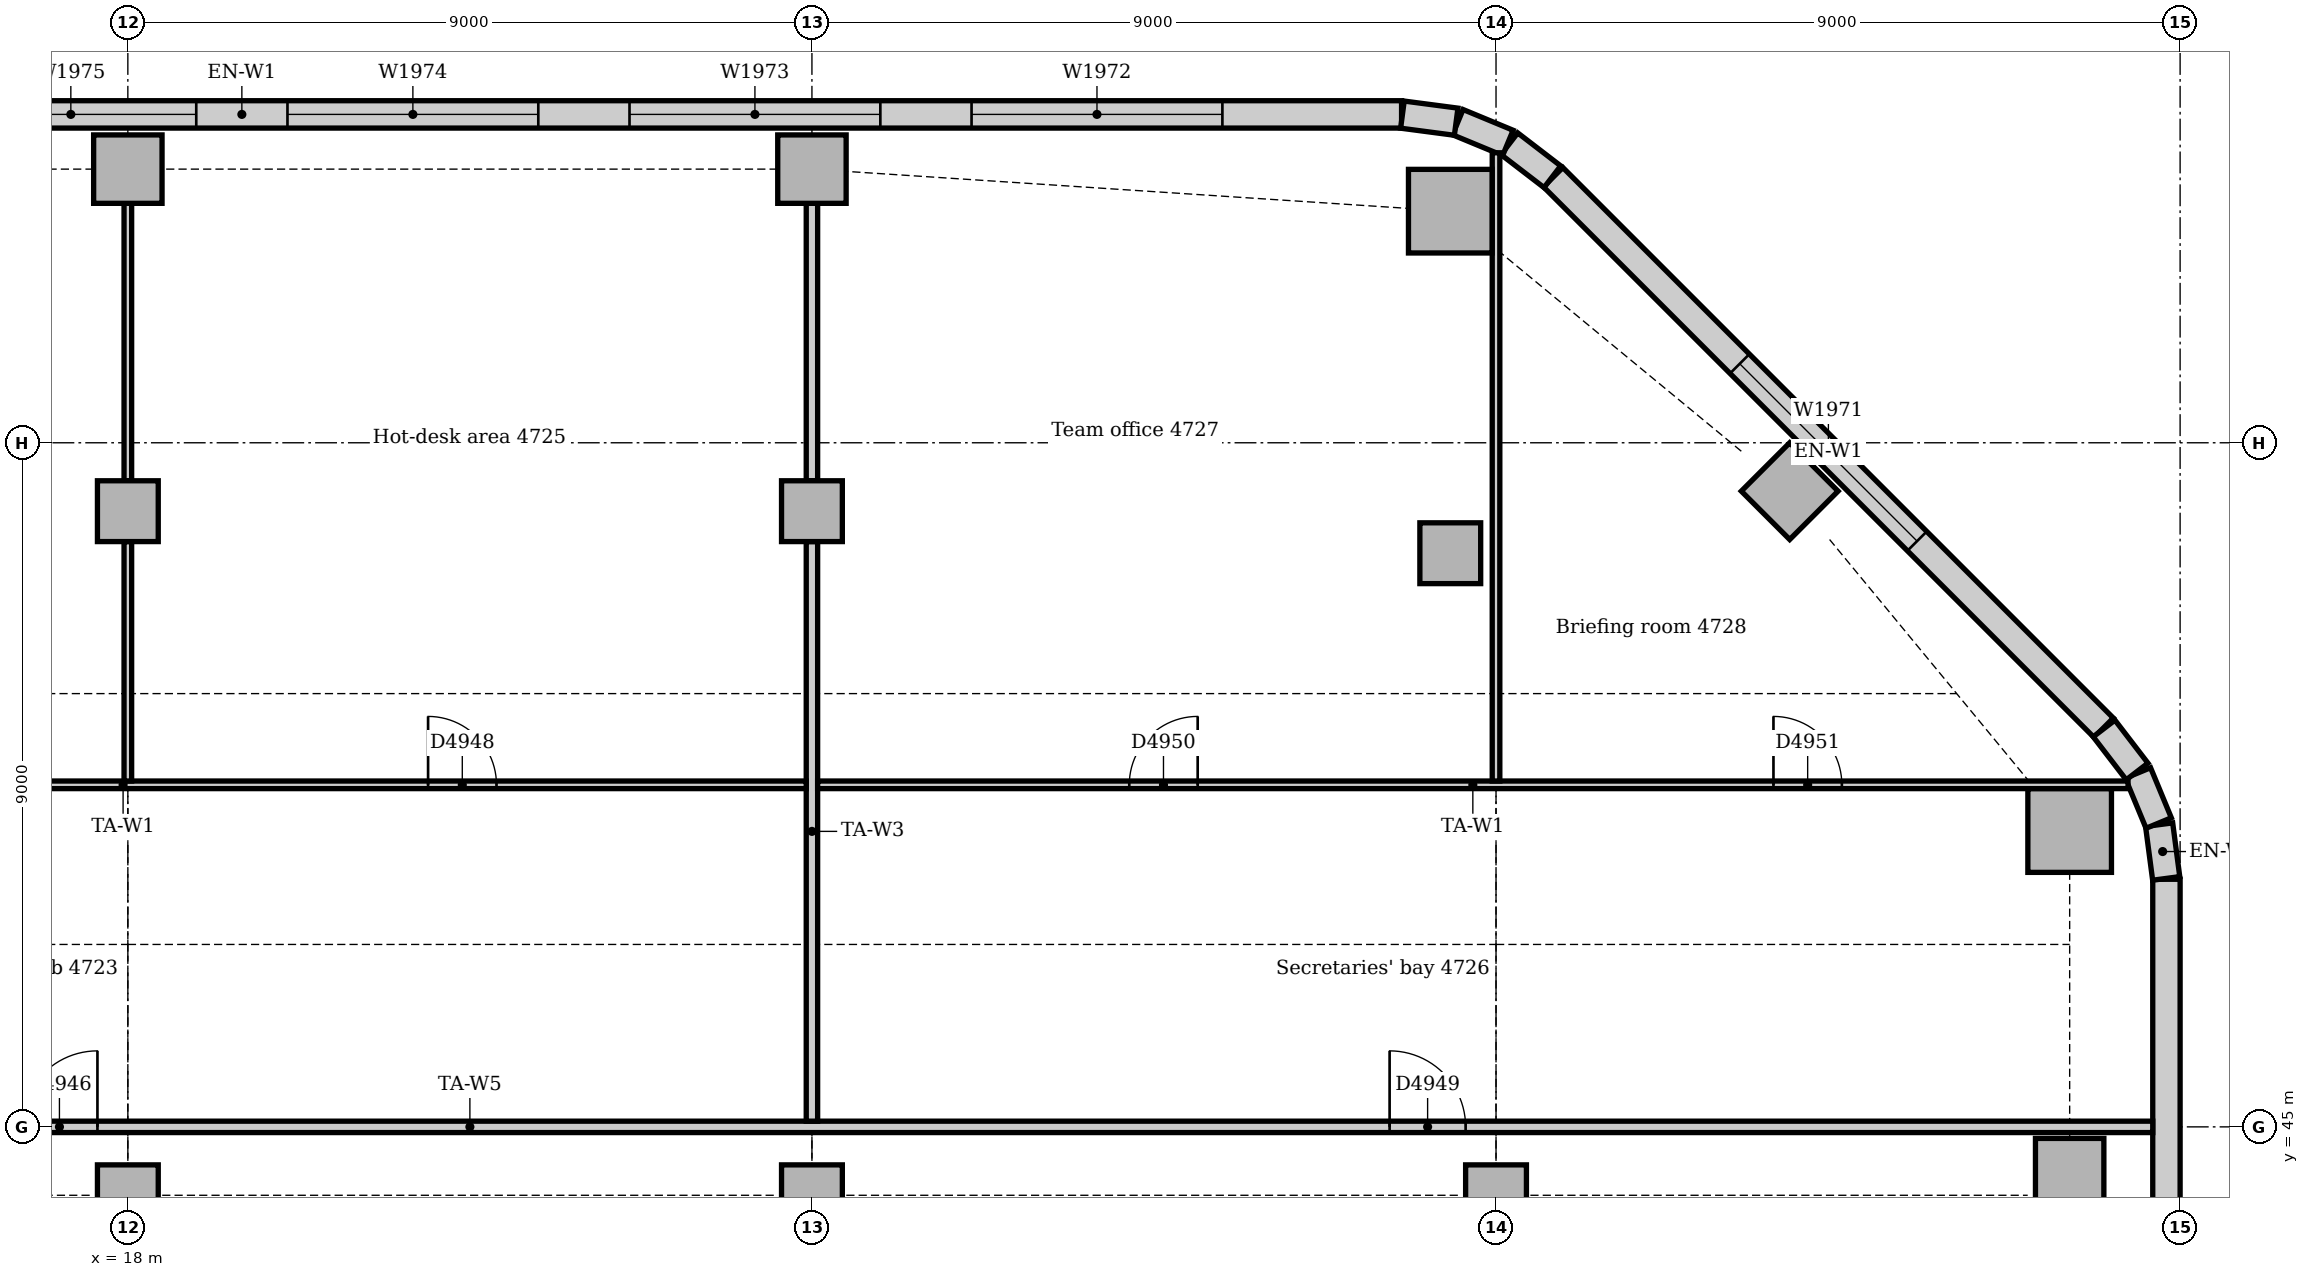
"""IFC4 building model, lengths in metres.
Left out: names, types, materials, properties, quantities, classifications, styles, units other than length and angle.
Written with IfcOpenShell. Run it as: python <this file> out.ifc"""

import sys

from ifc_helpers import new_model, si_unit, direction, frame, frame_2d, origin, origin_2d, place, context, subcontext, project, spatial, rectangle, extrude, element, fill, save


model = new_model("IFC4")
c1 = context("Model", 3, precision=1e-05, world=origin(), true_north=direction((0.0, 1.0)))
c2 = subcontext(c1, "Body", "Model", "MODEL_VIEW")
j1 = project(units=[si_unit("LENGTHUNIT", "METRE"), si_unit("PLANEANGLEUNIT", "RADIAN")], contexts=[c1])
p1 = place(None, origin())
s1 = spatial("IfcSite", under=j1, at=p1, CompositionType="ELEMENT")
p2 = place(p1, origin())
s2 = spatial("IfcBuilding", under=s1, at=p2, CompositionType="ELEMENT")
p3 = place(p2, frame((0.0, 0.0, 198.0)))
s3 = spatial("IfcBuildingStorey", under=s2, at=p3, CompositionType="ELEMENT", Elevation=198.0)
for number, where, z_axis, x_axis in (
    (1, (43.547, 48.898, -0.15), (0.0, 0.0, 1.0), (1.0, 0.0, 0.0)),
    (2, (35.398, 57.047, -0.15), (0.0, 0.0, 1.0), (1.0, 0.0, 0.0)),
):
    element("IfcColumn", number, at=place(p3, frame(where, z_axis=z_axis, x_axis=x_axis)), inside=s3, PredefinedType="COLUMN", context=c2, shape_type="SweptSolid", body=[
        extrude(rectangle(XDim=1.1, YDim=1.1, at=origin_2d()), origin(), (0.0, 0.0, 1.0), 4.0),
    ])
p4 = place(p3, frame((43.547, 44.398, 0.0), z_axis=(0.0, 0.0, 1.0), x_axis=(1.0, 0.0, 0.0)))
e3 = element("IfcColumn", 3, at=p4, inside=s3, PredefinedType="COLUMN", context=c2, shape_type="SweptSolid", body=[
    extrude(rectangle(XDim=0.9, YDim=0.9, at=origin_2d()), origin(), (0.0, 0.0, 1.0), 3.85),
])
for number, where, z_axis, x_axis in (
    (4, (39.864, 53.364, -0.15), (0.0, 0.0, 1.0), (0.707, 0.707, 0.0)),
    (5, (18.0, 57.6, -0.15), (0.0, 0.0, 1.0), (1.0, 0.0, 0.0)),
    (6, (27.0, 57.6, -0.15), (0.0, 0.0, 1.0), (1.0, 0.0, 0.0)),
):
    element("IfcColumn", number, at=place(p3, frame(where, z_axis=z_axis, x_axis=x_axis)), inside=s3, PredefinedType="COLUMN", context=c2, shape_type="SweptSolid", body=[
        extrude(rectangle(XDim=0.9, YDim=0.9, at=origin_2d()), origin(), (0.0, 0.0, 1.0), 4.0),
    ])
for number, where, z_axis, x_axis in (
    (7, (18.0, 44.1, 0.0), (0.0, 0.0, 1.0), (1.0, 0.0, 0.0)),
    (8, (18.0, 53.1, 0.0), (0.0, 0.0, 1.0), (1.0, 0.0, 0.0)),
    (9, (27.0, 44.1, 0.0), (0.0, 0.0, 1.0), (1.0, 0.0, 0.0)),
    (10, (27.0, 53.1, 0.0), (0.0, 0.0, 1.0), (1.0, 0.0, 0.0)),
    (11, (36.0, 44.1, 0.0), (0.0, 0.0, 1.0), (1.0, 0.0, 0.0)),
    (12, (35.398, 52.547, 0.0), (0.0, 0.0, 1.0), (1.0, 0.0, 0.0)),
):
    element("IfcColumn", number, at=place(p3, frame(where, z_axis=z_axis, x_axis=x_axis)), inside=s3, PredefinedType="COLUMN", context=c2, shape_type="SweptSolid", body=[
        extrude(rectangle(XDim=0.8, YDim=0.8, at=origin_2d()), origin(), (0.0, 0.0, 1.0), 3.85),
    ])
p5 = place(p3, frame((44.82, 23.743, 0.0), z_axis=(0.0, 0.0, 1.0), x_axis=(0.0, 1.0, 0.0)))
e13 = element("IfcWall", 13, at=p5, inside=s3, PredefinedType="STANDARD", context=c2, shape_type="SweptSolid", body=[
    extrude(rectangle(XDim=24.515, YDim=0.36, at=frame_2d((12.257, 0.0))), origin(), (0.0, 0.0, 1.0), 3.85),
])
p6 = place(p5, frame((3.857, 0.0, 0.9)))
e14 = element("IfcOpeningElement", 14, at=p6, cuts=e13, PredefinedType="OPENING", context=c2, shape_type="SweptSolid", body=[
    extrude(rectangle(XDim=3.3, YDim=1.6, at=frame_2d((1.65, 0.8))), frame((0.0, 0.19, 0.0), z_axis=(0.0, -1.0, 0.0), x_axis=(1.0, 0.0, 0.0)), (0.0, 0.0, 1.0), 0.38),
])
p7 = place(p5, frame((8.357, 0.0, 0.9)))
e15 = element("IfcOpeningElement", 15, at=p7, cuts=e13, PredefinedType="OPENING", context=c2, shape_type="SweptSolid", body=[
    extrude(rectangle(XDim=3.3, YDim=1.6, at=frame_2d((1.65, 0.8))), frame((0.0, 0.19, 0.0), z_axis=(0.0, -1.0, 0.0), x_axis=(1.0, 0.0, 0.0)), (0.0, 0.0, 1.0), 0.38),
])
p8 = place(p5, frame((12.857, 0.0, 0.9)))
e16 = element("IfcOpeningElement", 16, at=p8, cuts=e13, PredefinedType="OPENING", context=c2, shape_type="SweptSolid", body=[
    extrude(rectangle(XDim=3.3, YDim=1.6, at=frame_2d((1.65, 0.8))), frame((0.0, 0.19, 0.0), z_axis=(0.0, -1.0, 0.0), x_axis=(1.0, 0.0, 0.0)), (0.0, 0.0, 1.0), 0.38),
])
p9 = place(p5, frame((18.457, 0.0, 0.9)))
e17 = element("IfcOpeningElement", 17, at=p9, cuts=e13, PredefinedType="OPENING", context=c2, shape_type="SweptSolid", body=[
    extrude(rectangle(XDim=1.8, YDim=1.6, at=frame_2d((0.9, 0.8))), frame((0.0, 0.19, 0.0), z_axis=(0.0, -1.0, 0.0), x_axis=(1.0, 0.0, 0.0)), (0.0, 0.0, 1.0), 0.38),
])
p10 = place(p3, frame((43.994, 50.251, 0.0), z_axis=(0.0, 0.0, 1.0), x_axis=(-0.707106781187, 0.707106781187, 0.0)))
e18 = element("IfcWall", 18, at=p10, inside=s3, PredefinedType="STANDARD", context=c2, shape_type="SweptSolid", body=[
    extrude(rectangle(XDim=10.243, YDim=0.36, at=frame_2d((5.121, 0.0))), origin(), (0.0, 0.0, 1.0), 3.85),
])
p11 = place(p10, frame((3.471, 0.0, 0.9)))
e19 = element("IfcOpeningElement", 19, at=p11, cuts=e18, PredefinedType="OPENING", context=c2, shape_type="SweptSolid", body=[
    extrude(rectangle(XDim=3.3, YDim=1.6, at=frame_2d((1.65, 0.8))), frame((0.0, 0.19, 0.0), z_axis=(0.0, -1.0, 0.0), x_axis=(1.0, 0.0, 0.0)), (0.0, 0.0, 1.0), 0.38),
])
p12 = place(p3, frame((34.757, 58.32, 0.0), z_axis=(0.0, 0.0, 1.0), x_axis=(-1.0, 0.0, 0.0)))
e20 = element("IfcWall", 20, at=p12, inside=s3, PredefinedType="STANDARD", context=c2, shape_type="SweptSolid", body=[
    extrude(rectangle(XDim=30.515, YDim=0.36, at=frame_2d((15.257, 0.0))), origin(), (0.0, 0.0, 1.0), 3.85),
])
p13 = place(p12, frame((2.357, 0.0, 0.9)))
e21 = element("IfcOpeningElement", 21, at=p13, cuts=e20, PredefinedType="OPENING", context=c2, shape_type="SweptSolid", body=[
    extrude(rectangle(XDim=3.3, YDim=1.6, at=frame_2d((1.65, 0.8))), frame((0.0, 0.19, 0.0), z_axis=(0.0, -1.0, 0.0), x_axis=(1.0, 0.0, 0.0)), (0.0, 0.0, 1.0), 0.38),
])
p14 = place(p12, frame((6.857, 0.0, 0.9)))
e22 = element("IfcOpeningElement", 22, at=p14, cuts=e20, PredefinedType="OPENING", context=c2, shape_type="SweptSolid", body=[
    extrude(rectangle(XDim=3.3, YDim=1.6, at=frame_2d((1.65, 0.8))), frame((0.0, 0.19, 0.0), z_axis=(0.0, -1.0, 0.0), x_axis=(1.0, 0.0, 0.0)), (0.0, 0.0, 1.0), 0.38),
])
p15 = place(p12, frame((11.357, 0.0, 0.9)))
e23 = element("IfcOpeningElement", 23, at=p15, cuts=e20, PredefinedType="OPENING", context=c2, shape_type="SweptSolid", body=[
    extrude(rectangle(XDim=3.3, YDim=1.6, at=frame_2d((1.65, 0.8))), frame((0.0, 0.19, 0.0), z_axis=(0.0, -1.0, 0.0), x_axis=(1.0, 0.0, 0.0)), (0.0, 0.0, 1.0), 0.38),
])
p16 = place(p12, frame((15.857, 0.0, 0.9)))
e24 = element("IfcOpeningElement", 24, at=p16, cuts=e20, PredefinedType="OPENING", context=c2, shape_type="SweptSolid", body=[
    extrude(rectangle(XDim=3.3, YDim=1.6, at=frame_2d((1.65, 0.8))), frame((0.0, 0.19, 0.0), z_axis=(0.0, -1.0, 0.0), x_axis=(1.0, 0.0, 0.0)), (0.0, 0.0, 1.0), 0.38),
])
p17 = place(p12, frame((20.357, 0.0, 0.9)))
e25 = element("IfcOpeningElement", 25, at=p17, cuts=e20, PredefinedType="OPENING", context=c2, shape_type="SweptSolid", body=[
    extrude(rectangle(XDim=3.3, YDim=1.6, at=frame_2d((1.65, 0.8))), frame((0.0, 0.19, 0.0), z_axis=(0.0, -1.0, 0.0), x_axis=(1.0, 0.0, 0.0)), (0.0, 0.0, 1.0), 0.38),
])
p18 = place(p12, frame((24.857, 0.0, 0.9)))
e26 = element("IfcOpeningElement", 26, at=p18, cuts=e20, PredefinedType="OPENING", context=c2, shape_type="SweptSolid", body=[
    extrude(rectangle(XDim=3.3, YDim=1.6, at=frame_2d((1.65, 0.8))), frame((0.0, 0.19, 0.0), z_axis=(0.0, -1.0, 0.0), x_axis=(1.0, 0.0, 0.0)), (0.0, 0.0, 1.0), 0.38),
])
for number, where, z_axis, x_axis in (
    (27, (44.817, 48.269, 0.0), (0.0, 0.0, 1.0), (-0.131, 0.991, 0.0)),
    (28, (44.718, 48.997, 0.0), (0.0, 0.0, 1.0), (-0.383, 0.924, 0.0)),
):
    element("IfcWall", number, at=place(p3, frame(where, z_axis=z_axis, x_axis=x_axis)), inside=s3, PredefinedType="STANDARD", context=c2, shape_type="SweptSolid", body=[
        extrude(rectangle(XDim=0.713, YDim=0.36, at=frame_2d((0.356, 0.0))), origin(), (0.0, 0.0, 1.0), 3.85),
    ])
for number, where, z_axis, x_axis in (
    (29, (44.434, 49.675, 0.0), (0.0, 0.0, 1.0), (-0.609, 0.793, 0.0)),
    (30, (36.741, 57.5, 0.0), (0.0, 0.0, 1.0), (-0.793, 0.609, 0.0)),
):
    element("IfcWall", number, at=place(p3, frame(where, z_axis=z_axis, x_axis=x_axis)), inside=s3, PredefinedType="STANDARD", context=c2, shape_type="SweptSolid", body=[
        extrude(rectangle(XDim=0.713, YDim=0.36, at=frame_2d((0.357, 0.0))), origin(), (0.0, 0.0, 1.0), 3.85),
    ])
for number, where, z_axis, x_axis in (
    (31, (36.156, 57.945, 0.0), (0.0, 0.0, 1.0), (-0.924, 0.383, 0.0)),
    (32, (35.476, 58.224, 0.0), (0.0, 0.0, 1.0), (-0.991, 0.131, 0.0)),
):
    element("IfcWall", number, at=place(p3, frame(where, z_axis=z_axis, x_axis=x_axis)), inside=s3, PredefinedType="STANDARD", context=c2, shape_type="SweptSolid", body=[
        extrude(rectangle(XDim=0.713, YDim=0.36, at=frame_2d((0.356, 0.0))), origin(), (0.0, 0.0, 1.0), 3.85),
    ])
p19 = place(p3, frame((0.36, 45.0, 0.0), z_axis=(0.0, 0.0, 1.0), x_axis=(1.0, 0.0, 0.0)))
e33 = element("IfcWall", 33, at=p19, inside=s3, PredefinedType="PARTITIONING", context=c2, shape_type="SweptSolid", body=[
    extrude(rectangle(XDim=44.28, YDim=0.15, at=frame_2d((22.14, 0.0))), origin(), (0.0, 0.0, 1.0), 3.85),
])
p20 = place(p19, frame((3.95, 0.0, 0.0)))
e34 = element("IfcOpeningElement", 34, at=p20, cuts=e33, PredefinedType="OPENING", context=c2, shape_type="SweptSolid", body=[
    extrude(rectangle(XDim=0.9, YDim=2.1, at=frame_2d((0.45, 1.05))), frame((0.0, 0.085, 0.0), z_axis=(0.0, -1.0, 0.0), x_axis=(1.0, 0.0, 0.0)), (0.0, 0.0, 1.0), 0.17),
])
p21 = place(p19, frame((16.24, 0.0, 0.0)))
e35 = element("IfcOpeningElement", 35, at=p21, cuts=e33, PredefinedType="OPENING", context=c2, shape_type="SweptSolid", body=[
    extrude(rectangle(XDim=1.0, YDim=2.1, at=frame_2d((0.5, 1.05))), frame((0.0, 0.085, 0.0), z_axis=(0.0, -1.0, 0.0), x_axis=(1.0, 0.0, 0.0)), (0.0, 0.0, 1.0), 0.17),
])
p22 = place(p19, frame((34.24, 0.0, 0.0)))
e36 = element("IfcOpeningElement", 36, at=p22, cuts=e33, PredefinedType="OPENING", context=c2, shape_type="SweptSolid", body=[
    extrude(rectangle(XDim=1.0, YDim=2.1, at=frame_2d((0.5, 1.05))), frame((0.0, 0.085, 0.0), z_axis=(0.0, -1.0, 0.0), x_axis=(1.0, 0.0, 0.0)), (0.0, 0.0, 1.0), 0.17),
])
p23 = place(p3, frame((27.0, 45.075, 0.0), z_axis=(0.0, 0.0, 1.0), x_axis=(0.0, 1.0, 0.0)))
e37 = element("IfcWall", 37, at=p23, inside=s3, PredefinedType="PARTITIONING", context=c2, shape_type="SweptSolid", body=[
    extrude(rectangle(XDim=7.625, YDim=0.15, at=frame_2d((3.812, 0.0))), origin(), (0.0, 0.0, 1.0), 3.35),
])
p24 = place(p3, frame((27.0, 53.5, 0.0), z_axis=(0.0, 0.0, 1.0), x_axis=(0.0, 1.0, 0.0)))
e38 = element("IfcWall", 38, at=p24, inside=s3, PredefinedType="PARTITIONING", context=c2, shape_type="SweptSolid", body=[
    extrude(rectangle(XDim=3.65, YDim=0.15, at=frame_2d((1.825, 0.0))), origin(), (0.0, 0.0, 1.0), 3.41),
])
p25 = place(p3, frame((8.95, 49.5, 0.0), z_axis=(0.0, 0.0, 1.0), x_axis=(1.0, 0.0, 0.0)))
e39 = element("IfcWall", 39, at=p25, inside=s3, PredefinedType="PARTITIONING", context=c2, shape_type="SweptSolid", body=[
    extrude(rectangle(XDim=17.975, YDim=0.1, at=frame_2d((8.988, 0.0))), origin(), (0.0, 0.0, 1.0), 3.85),
])
p26 = place(p25, frame((4.15, 0.0, 0.0)))
e40 = element("IfcOpeningElement", 40, at=p26, cuts=e39, PredefinedType="OPENING", context=c2, shape_type="SweptSolid", body=[
    extrude(rectangle(XDim=0.9, YDim=2.1, at=frame_2d((0.45, 1.05))), frame((0.0, 0.06, 0.0), z_axis=(0.0, -1.0, 0.0), x_axis=(1.0, 0.0, 0.0)), (0.0, 0.0, 1.0), 0.12),
])
p27 = place(p25, frame((13.0, 0.0, 0.0)))
e41 = element("IfcOpeningElement", 41, at=p27, cuts=e39, PredefinedType="OPENING", context=c2, shape_type="SweptSolid", body=[
    extrude(rectangle(XDim=0.9, YDim=2.1, at=frame_2d((0.45, 1.05))), frame((0.0, 0.06, 0.0), z_axis=(0.0, -1.0, 0.0), x_axis=(1.0, 0.0, 0.0)), (0.0, 0.0, 1.0), 0.12),
])
p28 = place(p3, frame((27.075, 49.5, 0.0), z_axis=(0.0, 0.0, 1.0), x_axis=(1.0, 0.0, 0.0)))
e42 = element("IfcWall", 42, at=p28, inside=s3, PredefinedType="PARTITIONING", context=c2, shape_type="SweptSolid", body=[
    extrude(rectangle(XDim=17.24, YDim=0.1, at=frame_2d((8.62, 0.0))), origin(), (0.0, 0.0, 1.0), 3.85),
])
p29 = place(p28, frame((4.1, 0.0, 0.0)))
e43 = element("IfcOpeningElement", 43, at=p29, cuts=e42, PredefinedType="OPENING", context=c2, shape_type="SweptSolid", body=[
    extrude(rectangle(XDim=0.9, YDim=2.1, at=frame_2d((0.45, 1.05))), frame((0.0, 0.06, 0.0), z_axis=(0.0, -1.0, 0.0), x_axis=(1.0, 0.0, 0.0)), (0.0, 0.0, 1.0), 0.12),
])
p30 = place(p28, frame((12.575, 0.0, 0.0)))
e44 = element("IfcOpeningElement", 44, at=p30, cuts=e42, PredefinedType="OPENING", context=c2, shape_type="SweptSolid", body=[
    extrude(rectangle(XDim=0.9, YDim=2.1, at=frame_2d((0.45, 1.05))), frame((0.0, 0.06, 0.0), z_axis=(0.0, -1.0, 0.0), x_axis=(1.0, 0.0, 0.0)), (0.0, 0.0, 1.0), 0.12),
])
p31 = place(p3, frame((18.0, 49.55, 0.0), z_axis=(0.0, 0.0, 1.0), x_axis=(0.0, 1.0, 0.0)))
e45 = element("IfcWall", 45, at=p31, inside=s3, PredefinedType="PARTITIONING", context=c2, shape_type="SweptSolid", body=[
    extrude(rectangle(XDim=3.15, YDim=0.1, at=frame_2d((1.575, 0.0))), origin(), (0.0, 0.0, 1.0), 3.35),
])
p32 = place(p3, frame((18.0, 53.5, 0.0), z_axis=(0.0, 0.0, 1.0), x_axis=(0.0, 1.0, 0.0)))
e46 = element("IfcWall", 46, at=p32, inside=s3, PredefinedType="PARTITIONING", context=c2, shape_type="SweptSolid", body=[
    extrude(rectangle(XDim=3.65, YDim=0.1, at=frame_2d((1.825, 0.0))), origin(), (0.0, 0.0, 1.0), 3.41),
])
p33 = place(p3, frame((36.0, 49.55, 0.0), z_axis=(0.0, 0.0, 1.0), x_axis=(0.0, 1.0, 0.0)))
e47 = element("IfcWall", 47, at=p33, inside=s3, PredefinedType="PARTITIONING", context=c2, shape_type="SweptSolid", body=[
    extrude(rectangle(XDim=8.265, YDim=0.1, at=frame_2d((4.133, 0.0))), origin(), (0.0, 0.0, 1.0), 3.35),
])
p34 = place(p11, origin())
e48 = element("IfcWindow", 48, at=p34, inside=s3, PartitioningType="SINGLE_PANEL", PredefinedType="WINDOW", context=c2, shape_type="SweptSolid", body=[
    extrude(rectangle(XDim=3.3, YDim=1.6, at=frame_2d((1.65, 0.8))), frame((0.0, 0.13, 0.0), z_axis=(0.0, -1.0, 0.0), x_axis=(1.0, 0.0, 0.0)), (0.0, 0.0, 1.0), 0.06),
])
fill(e19, e48)
p35 = place(p13, origin())
e49 = element("IfcWindow", 49, at=p35, inside=s3, PartitioningType="SINGLE_PANEL", PredefinedType="WINDOW", context=c2, shape_type="SweptSolid", body=[
    extrude(rectangle(XDim=3.3, YDim=1.6, at=frame_2d((1.65, 0.8))), frame((0.0, 0.13, 0.0), z_axis=(0.0, -1.0, 0.0), x_axis=(1.0, 0.0, 0.0)), (0.0, 0.0, 1.0), 0.06),
])
fill(e21, e49)
p36 = place(p14, origin())
e50 = element("IfcWindow", 50, at=p36, inside=s3, PartitioningType="SINGLE_PANEL", PredefinedType="WINDOW", context=c2, shape_type="SweptSolid", body=[
    extrude(rectangle(XDim=3.3, YDim=1.6, at=frame_2d((1.65, 0.8))), frame((0.0, 0.13, 0.0), z_axis=(0.0, -1.0, 0.0), x_axis=(1.0, 0.0, 0.0)), (0.0, 0.0, 1.0), 0.06),
])
fill(e22, e50)
p37 = place(p15, origin())
e51 = element("IfcWindow", 51, at=p37, inside=s3, PartitioningType="SINGLE_PANEL", PredefinedType="WINDOW", context=c2, shape_type="SweptSolid", body=[
    extrude(rectangle(XDim=3.3, YDim=1.6, at=frame_2d((1.65, 0.8))), frame((0.0, 0.13, 0.0), z_axis=(0.0, -1.0, 0.0), x_axis=(1.0, 0.0, 0.0)), (0.0, 0.0, 1.0), 0.06),
])
fill(e23, e51)
p38 = place(p16, origin())
e52 = element("IfcWindow", 52, at=p38, inside=s3, PartitioningType="SINGLE_PANEL", PredefinedType="WINDOW", context=c2, shape_type="SweptSolid", body=[
    extrude(rectangle(XDim=3.3, YDim=1.6, at=frame_2d((1.65, 0.8))), frame((0.0, 0.13, 0.0), z_axis=(0.0, -1.0, 0.0), x_axis=(1.0, 0.0, 0.0)), (0.0, 0.0, 1.0), 0.06),
])
fill(e24, e52)
p39 = place(p21, origin())
e53 = element("IfcDoor", 53, at=p39, inside=s3, OperationType="SINGLE_SWING_RIGHT", PredefinedType="DOOR", context=c2, shape_type="SweptSolid", body=[
    extrude(rectangle(XDim=1.0, YDim=2.1, at=frame_2d((0.5, 1.05))), frame((0.0, 0.025, 0.0), z_axis=(0.0, -1.0, 0.0), x_axis=(1.0, 0.0, 0.0)), (0.0, 0.0, 1.0), 0.05),
])
fill(e35, e53)
p40 = place(p27, origin())
e54 = element("IfcDoor", 54, at=p40, inside=s3, OperationType="SINGLE_SWING_LEFT", PredefinedType="DOOR", context=c2, shape_type="SweptSolid", body=[
    extrude(rectangle(XDim=0.9, YDim=2.1, at=frame_2d((0.45, 1.05))), frame((0.0, 0.025, 0.0), z_axis=(0.0, -1.0, 0.0), x_axis=(1.0, 0.0, 0.0)), (0.0, 0.0, 1.0), 0.05),
])
fill(e41, e54)
p41 = place(p22, origin())
e55 = element("IfcDoor", 55, at=p41, inside=s3, OperationType="SINGLE_SWING_LEFT", PredefinedType="DOOR", context=c2, shape_type="SweptSolid", body=[
    extrude(rectangle(XDim=1.0, YDim=2.1, at=frame_2d((0.5, 1.05))), frame((0.0, 0.025, 0.0), z_axis=(0.0, -1.0, 0.0), x_axis=(1.0, 0.0, 0.0)), (0.0, 0.0, 1.0), 0.05),
])
fill(e36, e55)
p42 = place(p29, origin())
e56 = element("IfcDoor", 56, at=p42, inside=s3, OperationType="SINGLE_SWING_RIGHT", PredefinedType="DOOR", context=c2, shape_type="SweptSolid", body=[
    extrude(rectangle(XDim=0.9, YDim=2.1, at=frame_2d((0.45, 1.05))), frame((0.0, 0.025, 0.0), z_axis=(0.0, -1.0, 0.0), x_axis=(1.0, 0.0, 0.0)), (0.0, 0.0, 1.0), 0.05),
])
fill(e43, e56)
p43 = place(p30, origin())
e57 = element("IfcDoor", 57, at=p43, inside=s3, OperationType="SINGLE_SWING_LEFT", PredefinedType="DOOR", context=c2, shape_type="SweptSolid", body=[
    extrude(rectangle(XDim=0.9, YDim=2.1, at=frame_2d((0.45, 1.05))), frame((0.0, 0.025, 0.0), z_axis=(0.0, -1.0, 0.0), x_axis=(1.0, 0.0, 0.0)), (0.0, 0.0, 1.0), 0.05),
])
fill(e44, e57)
save(model, sys.argv[1])
